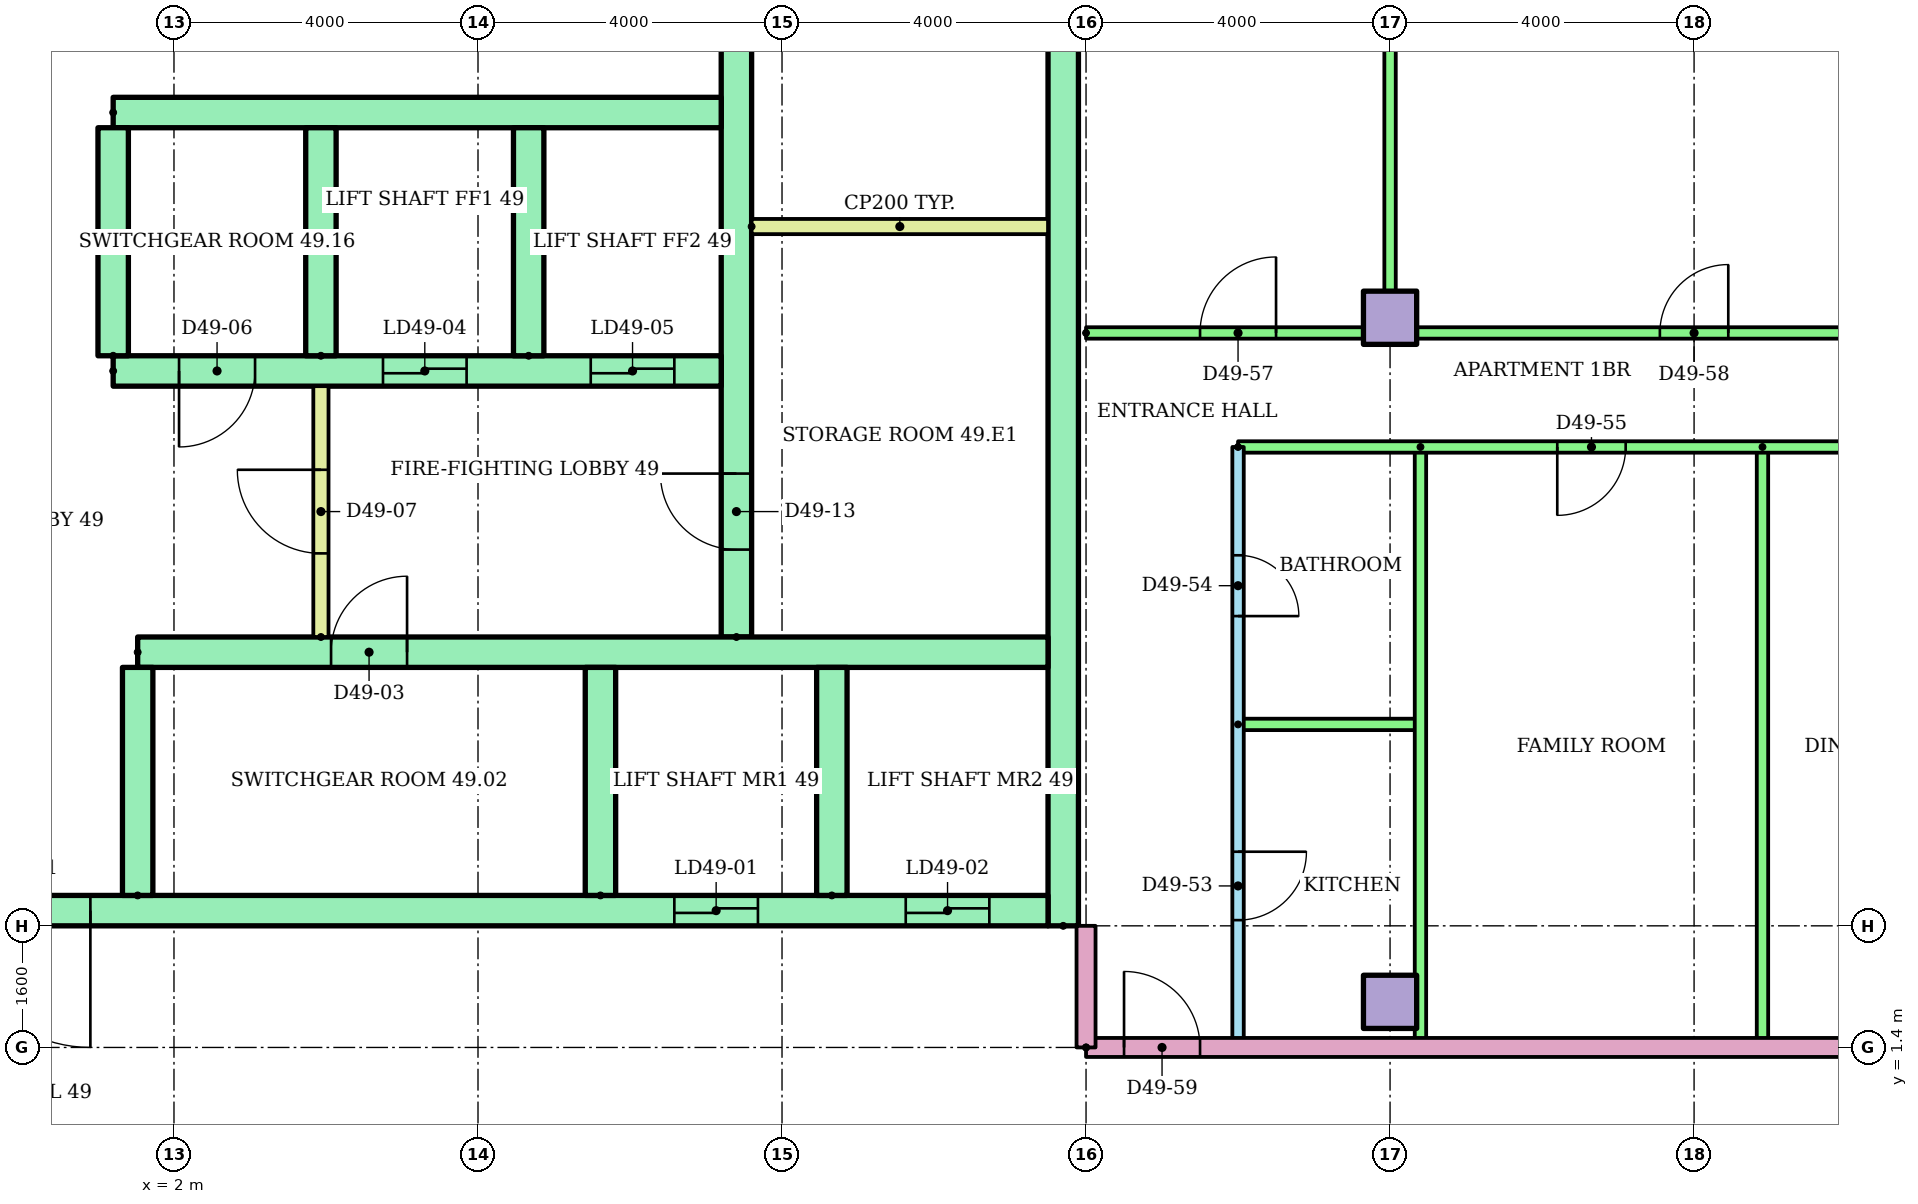
"""IFC4 building model, lengths in metres.
Left out: names, types, materials, properties, quantities, classifications, styles, units other than length and angle.
Written with IfcOpenShell. Run it as: python <this file> out.ifc"""

import sys

from ifc_helpers import new_model, si_unit, direction, frame, frame_2d, origin, origin_2d, place, context, subcontext, project, spatial, rectangle, extrude, element, fill, save


model = new_model("IFC4")
c1 = context("Model", 3, precision=1e-05, world=origin(), true_north=direction((0.0, 1.0)))
c2 = subcontext(c1, "Body", "Model", "MODEL_VIEW")
j1 = project(units=[si_unit("LENGTHUNIT", "METRE"), si_unit("PLANEANGLEUNIT", "RADIAN")], contexts=[c1])
p1 = place(None, origin())
s1 = spatial("IfcSite", under=j1, at=p1, CompositionType="ELEMENT")
p2 = place(p1, origin())
s2 = spatial("IfcBuilding", under=s1, at=p2, CompositionType="ELEMENT")
p3 = place(p2, frame((0.0, 0.0, 187.7)))
s3 = spatial("IfcBuildingStorey", under=s2, at=p3, CompositionType="ELEMENT", Elevation=187.7)
for number, where in (
    (1, (18.0, 2.0, 0.0)),
    (2, (18.0, 11.0, 0.0)),
):
    element("IfcColumn", number, at=place(p3, frame(where)), inside=s3, PredefinedType="COLUMN", context=c2, shape_type="SweptSolid", body=[
        extrude(rectangle(XDim=0.7, YDim=0.7, at=origin_2d()), origin(), (0.0, 0.0, 1.0), 3.2),
    ])
p4 = place(p3, frame((13.7, 3.0, 0.0), z_axis=(0.0, 0.0, 1.0), x_axis=(0.0, 1.0, 0.0)))
e3 = element("IfcWall", 3, at=p4, inside=s3, PredefinedType="SHEAR", context=c2, shape_type="SweptSolid", body=[
    extrude(rectangle(XDim=17.0, YDim=0.4, at=frame_2d((8.5, 0.0))), origin(), (0.0, 0.0, 1.0), 2.92),
])
p5 = place(p3, frame((9.4, 6.8, 0.0), z_axis=(0.0, 0.0, 1.0), x_axis=(0.0, 1.0, 0.0)))
e4 = element("IfcWall", 4, at=p5, inside=s3, PredefinedType="SHEAR", context=c2, shape_type="SweptSolid", body=[
    extrude(rectangle(XDim=12.7, YDim=0.4, at=frame_2d((6.35, 0.0))), origin(), (0.0, 0.0, 1.0), 2.92),
])
p6 = place(p5, frame((1.15, 0.0, 0.0)))
e5 = element("IfcOpeningElement", 5, at=p6, cuts=e4, PredefinedType="OPENING", context=c2, shape_type="SweptSolid", body=[
    extrude(rectangle(XDim=1.0, YDim=2.1, at=frame_2d((0.5, 1.05))), frame((0.0, 0.21, 0.0), z_axis=(0.0, -1.0, 0.0), x_axis=(1.0, 0.0, 0.0)), (0.0, 0.0, 1.0), 0.42),
])
p7 = place(p5, frame((7.925, 0.0, 0.0)))
e6 = element("IfcOpeningElement", 6, at=p7, cuts=e4, PredefinedType="OPENING", context=c2, shape_type="SweptSolid", body=[
    extrude(rectangle(XDim=1.0, YDim=2.1, at=frame_2d((0.5, 1.05))), frame((0.0, 0.21, 0.0), z_axis=(0.0, -1.0, 0.0), x_axis=(1.0, 0.0, 0.0)), (0.0, 0.0, 1.0), 0.42),
])
p8 = place(p3, frame((-13.5, 3.2, 0.0)))
e7 = element("IfcWall", 7, at=p8, inside=s3, PredefinedType="SHEAR", context=c2, shape_type="SweptSolid", body=[
    extrude(rectangle(XDim=27.0, YDim=0.4, at=frame_2d((13.5, 0.0))), origin(), (0.0, 0.0, 1.0), 2.92),
])
p9 = place(p8, frame((22.083, 0.0, 0.0)))
e8 = element("IfcOpeningElement", 8, at=p9, cuts=e7, PredefinedType="OPENING", context=c2, shape_type="SweptSolid", body=[
    extrude(rectangle(XDim=1.1, YDim=2.1, at=frame_2d((0.55, 1.05))), frame((0.0, 0.21, 0.0), z_axis=(0.0, -1.0, 0.0), x_axis=(1.0, 0.0, 0.0)), (0.0, 0.0, 1.0), 0.42),
])
p10 = place(p8, frame((25.128, 0.0, 0.0)))
e9 = element("IfcOpeningElement", 9, at=p10, cuts=e7, PredefinedType="OPENING", context=c2, shape_type="SweptSolid", body=[
    extrude(rectangle(XDim=1.1, YDim=2.1, at=frame_2d((0.55, 1.05))), frame((0.0, 0.21, 0.0), z_axis=(0.0, -1.0, 0.0), x_axis=(1.0, 0.0, 0.0)), (0.0, 0.0, 1.0), 0.42),
])
p11 = place(p8, frame((12.6, 0.0, 0.0)))
e10 = element("IfcOpeningElement", 10, at=p11, cuts=e7, PredefinedType="OPENING", context=c2, shape_type="SweptSolid", body=[
    extrude(rectangle(XDim=1.8, YDim=2.1, at=frame_2d((0.9, 1.05))), frame((0.0, 0.21, 0.0), z_axis=(0.0, -1.0, 0.0), x_axis=(1.0, 0.0, 0.0)), (0.0, 0.0, 1.0), 0.42),
])
p12 = place(p3, frame((1.522, 6.6, 0.0)))
e11 = element("IfcWall", 11, at=p12, inside=s3, PredefinedType="SHEAR", context=c2, shape_type="SweptSolid", body=[
    extrude(rectangle(XDim=11.978, YDim=0.4, at=frame_2d((5.989, 0.0))), origin(), (0.0, 0.0, 1.0), 2.92),
])
p13 = place(p12, frame((2.544, 0.0, 0.0)))
e12 = element("IfcOpeningElement", 12, at=p13, cuts=e11, PredefinedType="OPENING", context=c2, shape_type="SweptSolid", body=[
    extrude(rectangle(XDim=1.0, YDim=2.1, at=frame_2d((0.5, 1.05))), frame((0.0, 0.21, 0.0), z_axis=(0.0, -1.0, 0.0), x_axis=(1.0, 0.0, 0.0)), (0.0, 0.0, 1.0), 0.42),
])
for number, where, z_axis, x_axis in (
    (13, (1.522, 3.4, 0.0), (0.0, 0.0, 1.0), (0.0, 1.0, 0.0)),
    (14, (7.611, 3.4, 0.0), (0.0, 0.0, 1.0), (0.0, 1.0, 0.0)),
    (15, (10.656, 3.4, 0.0), (0.0, 0.0, 1.0), (0.0, 1.0, 0.0)),
):
    element("IfcWall", number, at=place(p3, frame(where, z_axis=z_axis, x_axis=x_axis)), inside=s3, PredefinedType="SHEAR", context=c2, shape_type="SweptSolid", body=[
        extrude(rectangle(XDim=3.0, YDim=0.4, at=frame_2d((1.5, 0.0))), origin(), (0.0, 0.0, 1.0), 2.92),
    ])
p14 = place(p3, frame((1.2, 10.3, 0.0)))
e16 = element("IfcWall", 16, at=p14, inside=s3, PredefinedType="SHEAR", context=c2, shape_type="SweptSolid", body=[
    extrude(rectangle(XDim=8.0, YDim=0.4, at=frame_2d((4.0, 0.0))), origin(), (0.0, 0.0, 1.0), 2.92),
])
p15 = place(p14, frame((3.55, 0.0, 0.0)))
e17 = element("IfcOpeningElement", 17, at=p15, cuts=e16, PredefinedType="OPENING", context=c2, shape_type="SweptSolid", body=[
    extrude(rectangle(XDim=1.1, YDim=2.1, at=frame_2d((0.55, 1.05))), frame((0.0, 0.21, 0.0), z_axis=(0.0, -1.0, 0.0), x_axis=(1.0, 0.0, 0.0)), (0.0, 0.0, 1.0), 0.42),
])
p16 = place(p14, frame((6.283, 0.0, 0.0)))
e18 = element("IfcOpeningElement", 18, at=p16, cuts=e16, PredefinedType="OPENING", context=c2, shape_type="SweptSolid", body=[
    extrude(rectangle(XDim=1.1, YDim=2.1, at=frame_2d((0.55, 1.05))), frame((0.0, 0.21, 0.0), z_axis=(0.0, -1.0, 0.0), x_axis=(1.0, 0.0, 0.0)), (0.0, 0.0, 1.0), 0.42),
])
p17 = place(p14, frame((0.867, 0.0, 0.0)))
e19 = element("IfcOpeningElement", 19, at=p17, cuts=e16, PredefinedType="OPENING", context=c2, shape_type="SweptSolid", body=[
    extrude(rectangle(XDim=1.0, YDim=2.1, at=frame_2d((0.5, 1.05))), frame((0.0, 0.21, 0.0), z_axis=(0.0, -1.0, 0.0), x_axis=(1.0, 0.0, 0.0)), (0.0, 0.0, 1.0), 0.42),
])
p18 = place(p3, frame((1.2, 13.7, 0.0)))
e20 = element("IfcWall", 20, at=p18, inside=s3, PredefinedType="SHEAR", context=c2, shape_type="SweptSolid", body=[
    extrude(rectangle(XDim=8.0, YDim=0.4, at=frame_2d((4.0, 0.0))), origin(), (0.0, 0.0, 1.0), 2.92),
])
for number, where, z_axis, x_axis in (
    (21, (1.2, 10.5, 0.0), (0.0, 0.0, 1.0), (0.0, 1.0, 0.0)),
    (22, (3.933, 10.5, 0.0), (0.0, 0.0, 1.0), (0.0, 1.0, 0.0)),
    (23, (6.667, 10.5, 0.0), (0.0, 0.0, 1.0), (0.0, 1.0, 0.0)),
):
    element("IfcWall", number, at=place(p3, frame(where, z_axis=z_axis, x_axis=x_axis)), inside=s3, PredefinedType="SHEAR", context=c2, shape_type="SweptSolid", body=[
        extrude(rectangle(XDim=3.0, YDim=0.4, at=frame_2d((1.5, 0.0))), origin(), (0.0, 0.0, 1.0), 2.92),
    ])
p19 = place(p3, frame((3.933, 6.8, 0.0), z_axis=(0.0, 0.0, 1.0), x_axis=(0.0, 1.0, 0.0)))
e24 = element("IfcWall", 24, at=p19, inside=s3, PredefinedType="PARTITIONING", context=c2, shape_type="SweptSolid", body=[
    extrude(rectangle(XDim=3.3, YDim=0.2, at=frame_2d((1.65, 0.0))), origin(), (0.0, 0.0, 1.0), 2.92),
])
p20 = place(p19, frame((1.1, 0.0, 0.0)))
e25 = element("IfcOpeningElement", 25, at=p20, cuts=e24, PredefinedType="OPENING", context=c2, shape_type="SweptSolid", body=[
    extrude(rectangle(XDim=1.1, YDim=2.1, at=frame_2d((0.55, 1.05))), frame((0.0, 0.11, 0.0), z_axis=(0.0, -1.0, 0.0), x_axis=(1.0, 0.0, 0.0)), (0.0, 0.0, 1.0), 0.22),
])
p21 = place(p3, frame((9.6, 12.2, 0.0)))
e26 = element("IfcWall", 26, at=p21, inside=s3, PredefinedType="PARTITIONING", context=c2, shape_type="SweptSolid", body=[
    extrude(rectangle(XDim=3.9, YDim=0.2, at=frame_2d((1.95, 0.0))), origin(), (0.0, 0.0, 1.0), 2.92),
])
p22 = place(p3, frame((16.0, 9.3, 0.0), z_axis=(0.0, 0.0, 1.0), x_axis=(0.0, -1.0, 0.0)))
e27 = element("IfcWall", 27, at=p22, inside=s3, PredefinedType="PARTITIONING", context=c2, shape_type="SweptSolid", body=[
    extrude(rectangle(XDim=7.9, YDim=0.15, at=frame_2d((3.95, 0.0))), origin(), (0.0, 0.0, 1.0), 2.4),
])
p23 = place(p22, frame((5.325, 0.0, 0.0)))
e28 = element("IfcOpeningElement", 28, at=p23, cuts=e27, PredefinedType="OPENING", context=c2, shape_type="SweptSolid", body=[
    extrude(rectangle(XDim=0.9, YDim=2.1, at=frame_2d((0.45, 1.05))), frame((0.0, 0.085, 0.0), z_axis=(0.0, -1.0, 0.0), x_axis=(1.0, 0.0, 0.0)), (0.0, 0.0, 1.0), 0.17),
])
p24 = place(p22, frame((1.425, 0.0, 0.0)))
e29 = element("IfcOpeningElement", 29, at=p24, cuts=e27, PredefinedType="OPENING", context=c2, shape_type="SweptSolid", body=[
    extrude(rectangle(XDim=0.8, YDim=2.1, at=frame_2d((0.4, 1.05))), frame((0.0, 0.085, 0.0), z_axis=(0.0, -1.0, 0.0), x_axis=(1.0, 0.0, 0.0)), (0.0, 0.0, 1.0), 0.17),
])
p25 = place(p3, frame((16.0, 5.65, 0.0)))
e30 = element("IfcWall", 30, at=p25, inside=s3, PredefinedType="PARTITIONING", context=c2, shape_type="SweptSolid", body=[
    extrude(rectangle(XDim=2.4, YDim=0.15, at=frame_2d((1.2, 0.0))), origin(), (0.0, 0.0, 1.0), 2.4),
])
for number, where, z_axis, x_axis in (
    (31, (18.4, 9.3, 0.0), (0.0, 0.0, 1.0), (0.0, -1.0, 0.0)),
    (32, (22.9, 9.3, 0.0), (0.0, 0.0, 1.0), (0.0, -1.0, 0.0)),
):
    element("IfcWall", number, at=place(p3, frame(where, z_axis=z_axis, x_axis=x_axis)), inside=s3, PredefinedType="PARTITIONING", context=c2, shape_type="SweptSolid", body=[
        extrude(rectangle(XDim=7.9, YDim=0.15, at=frame_2d((3.95, 0.0))), origin(), (0.0, 0.0, 1.0), 2.4),
    ])
p26 = place(p3, frame((26.0, 9.3, 0.0), z_axis=(0.0, 0.0, 1.0), x_axis=(-1.0, 0.0, 0.0)))
e33 = element("IfcWall", 33, at=p26, inside=s3, PredefinedType="PARTITIONING", context=c2, shape_type="SweptSolid", body=[
    extrude(rectangle(XDim=10.0, YDim=0.15, at=frame_2d((5.0, 0.0))), origin(), (0.0, 0.0, 1.0), 2.4),
])
p27 = place(p26, frame((4.9, 0.0, 0.0)))
e34 = element("IfcOpeningElement", 34, at=p27, cuts=e33, PredefinedType="OPENING", context=c2, shape_type="SweptSolid", body=[
    extrude(rectangle(XDim=0.9, YDim=2.1, at=frame_2d((0.45, 1.05))), frame((0.0, 0.085, 0.0), z_axis=(0.0, -1.0, 0.0), x_axis=(1.0, 0.0, 0.0)), (0.0, 0.0, 1.0), 0.17),
])
p28 = place(p26, frame((1.1, 0.0, 0.0)))
e35 = element("IfcOpeningElement", 35, at=p28, cuts=e33, PredefinedType="OPENING", context=c2, shape_type="SweptSolid", body=[
    extrude(rectangle(XDim=0.9, YDim=2.1, at=frame_2d((0.45, 1.05))), frame((0.0, 0.085, 0.0), z_axis=(0.0, -1.0, 0.0), x_axis=(1.0, 0.0, 0.0)), (0.0, 0.0, 1.0), 0.17),
])
p29 = place(p3, frame((14.0, 10.8, 0.0)))
e36 = element("IfcWall", 36, at=p29, inside=s3, PredefinedType="PARTITIONING", context=c2, shape_type="SweptSolid", body=[
    extrude(rectangle(XDim=12.0, YDim=0.15, at=frame_2d((6.0, 0.0))), origin(), (0.0, 0.0, 1.0), 2.4),
])
p30 = place(p29, frame((1.5, 0.0, 0.0)))
e37 = element("IfcOpeningElement", 37, at=p30, cuts=e36, PredefinedType="OPENING", context=c2, shape_type="SweptSolid", body=[
    extrude(rectangle(XDim=1.0, YDim=2.1, at=frame_2d((0.5, 1.05))), frame((0.0, 0.085, 0.0), z_axis=(0.0, -1.0, 0.0), x_axis=(1.0, 0.0, 0.0)), (0.0, 0.0, 1.0), 0.17),
])
p31 = place(p29, frame((7.55, 0.0, 0.0)))
e38 = element("IfcOpeningElement", 38, at=p31, cuts=e36, PredefinedType="OPENING", context=c2, shape_type="SweptSolid", body=[
    extrude(rectangle(XDim=0.9, YDim=2.1, at=frame_2d((0.45, 1.05))), frame((0.0, 0.085, 0.0), z_axis=(0.0, -1.0, 0.0), x_axis=(1.0, 0.0, 0.0)), (0.0, 0.0, 1.0), 0.17),
])
p32 = place(p3, frame((18.0, 18.821, 0.0), z_axis=(0.0, 0.0, 1.0), x_axis=(0.0, -1.0, 0.0)))
e39 = element("IfcWall", 39, at=p32, inside=s3, PredefinedType="PARTITIONING", context=c2, shape_type="SweptSolid", body=[
    extrude(rectangle(XDim=8.021, YDim=0.15, at=frame_2d((4.01, 0.0))), origin(), (0.0, 0.0, 1.0), 2.4),
])
p33 = place(p3, frame((14.0, 1.4, 0.0)))
e40 = element("IfcWall", 40, at=p33, inside=s3, PredefinedType="PARTITIONING", context=c2, shape_type="SweptSolid", body=[
    extrude(rectangle(XDim=15.0, YDim=0.25, at=frame_2d((7.5, 0.0))), origin(), (0.0, 0.0, 1.0), 2.4),
])
p34 = place(p33, frame((0.5, 0.0, 0.0)))
e41 = element("IfcOpeningElement", 41, at=p34, cuts=e40, PredefinedType="OPENING", context=c2, shape_type="SweptSolid", body=[
    extrude(rectangle(XDim=1.0, YDim=2.1, at=frame_2d((0.5, 1.05))), frame((0.0, 0.135, 0.0), z_axis=(0.0, -1.0, 0.0), x_axis=(1.0, 0.0, 0.0)), (0.0, 0.0, 1.0), 0.27),
])
p35 = place(p33, frame((12.547, 0.0, 0.0)))
e42 = element("IfcOpeningElement", 42, at=p35, cuts=e40, PredefinedType="OPENING", context=c2, shape_type="SweptSolid", body=[
    extrude(rectangle(XDim=1.0, YDim=2.1, at=frame_2d((0.5, 1.05))), frame((0.0, 0.135, 0.0), z_axis=(0.0, -1.0, 0.0), x_axis=(1.0, 0.0, 0.0)), (0.0, 0.0, 1.0), 0.27),
])
p36 = place(p3, frame((14.0, 1.4, 0.0), z_axis=(0.0, 0.0, 1.0), x_axis=(0.0, 1.0, 0.0)))
e43 = element("IfcWall", 43, at=p36, inside=s3, PredefinedType="PARTITIONING", context=c2, shape_type="SweptSolid", body=[
    extrude(rectangle(XDim=1.6, YDim=0.25, at=frame_2d((0.8, 0.0))), origin(), (0.0, 0.0, 1.0), 2.4),
])
p37 = place(p9, origin())
e44 = element("IfcDoor", 44, at=p37, inside=s3, OperationType="SLIDING_TO_LEFT", PredefinedType="DOOR", context=c2, shape_type="SweptSolid", body=[
    extrude(rectangle(XDim=1.1, YDim=2.1, at=frame_2d((0.55, 1.05))), frame((0.0, 0.025, 0.0), z_axis=(0.0, -1.0, 0.0), x_axis=(1.0, 0.0, 0.0)), (0.0, 0.0, 1.0), 0.05),
])
fill(e8, e44)
p38 = place(p10, origin())
e45 = element("IfcDoor", 45, at=p38, inside=s3, OperationType="SLIDING_TO_LEFT", PredefinedType="DOOR", context=c2, shape_type="SweptSolid", body=[
    extrude(rectangle(XDim=1.1, YDim=2.1, at=frame_2d((0.55, 1.05))), frame((0.0, 0.025, 0.0), z_axis=(0.0, -1.0, 0.0), x_axis=(1.0, 0.0, 0.0)), (0.0, 0.0, 1.0), 0.05),
])
fill(e9, e45)
p39 = place(p11, frame((1.8, 0.0, 0.0), z_axis=(0.0, 0.0, 1.0), x_axis=(-1.0, 0.0, 0.0)))
e46 = element("IfcDoor", 46, at=p39, inside=s3, OperationType="DOUBLE_DOOR_SINGLE_SWING", PredefinedType="DOOR", context=c2, shape_type="SweptSolid", body=[
    extrude(rectangle(XDim=1.8, YDim=2.1, at=frame_2d((0.9, 1.05))), frame((0.0, 0.025, 0.0), z_axis=(0.0, -1.0, 0.0), x_axis=(1.0, 0.0, 0.0)), (0.0, 0.0, 1.0), 0.05),
])
fill(e10, e46)
p40 = place(p13, origin())
e47 = element("IfcDoor", 47, at=p40, inside=s3, OperationType="SINGLE_SWING_RIGHT", PredefinedType="DOOR", context=c2, shape_type="SweptSolid", body=[
    extrude(rectangle(XDim=1.0, YDim=2.1, at=frame_2d((0.5, 1.05))), frame((0.0, 0.025, 0.0), z_axis=(0.0, -1.0, 0.0), x_axis=(1.0, 0.0, 0.0)), (0.0, 0.0, 1.0), 0.05),
])
fill(e12, e47)
p41 = place(p15, origin())
e48 = element("IfcDoor", 48, at=p41, inside=s3, OperationType="SLIDING_TO_LEFT", PredefinedType="DOOR", context=c2, shape_type="SweptSolid", body=[
    extrude(rectangle(XDim=1.1, YDim=2.1, at=frame_2d((0.55, 1.05))), frame((0.0, 0.025, 0.0), z_axis=(0.0, -1.0, 0.0), x_axis=(1.0, 0.0, 0.0)), (0.0, 0.0, 1.0), 0.05),
])
fill(e17, e48)
p42 = place(p16, origin())
e49 = element("IfcDoor", 49, at=p42, inside=s3, OperationType="SLIDING_TO_LEFT", PredefinedType="DOOR", context=c2, shape_type="SweptSolid", body=[
    extrude(rectangle(XDim=1.1, YDim=2.1, at=frame_2d((0.55, 1.05))), frame((0.0, 0.025, 0.0), z_axis=(0.0, -1.0, 0.0), x_axis=(1.0, 0.0, 0.0)), (0.0, 0.0, 1.0), 0.05),
])
fill(e18, e49)
p43 = place(p17, frame((1.0, 0.0, 0.0), z_axis=(0.0, 0.0, 1.0), x_axis=(-1.0, 0.0, 0.0)))
e50 = element("IfcDoor", 50, at=p43, inside=s3, OperationType="SINGLE_SWING_LEFT", PredefinedType="DOOR", context=c2, shape_type="SweptSolid", body=[
    extrude(rectangle(XDim=1.0, YDim=2.1, at=frame_2d((0.5, 1.05))), frame((0.0, 0.025, 0.0), z_axis=(0.0, -1.0, 0.0), x_axis=(1.0, 0.0, 0.0)), (0.0, 0.0, 1.0), 0.05),
])
fill(e19, e50)
p44 = place(p20, origin())
e51 = element("IfcDoor", 51, at=p44, inside=s3, OperationType="SINGLE_SWING_RIGHT", PredefinedType="DOOR", context=c2, shape_type="SweptSolid", body=[
    extrude(rectangle(XDim=1.1, YDim=2.1, at=frame_2d((0.55, 1.05))), frame((0.0, 0.025, 0.0), z_axis=(0.0, -1.0, 0.0), x_axis=(1.0, 0.0, 0.0)), (0.0, 0.0, 1.0), 0.05),
])
fill(e25, e51)
p45 = place(p6, origin())
e52 = element("IfcDoor", 52, at=p45, inside=s3, OperationType="SINGLE_SWING_RIGHT", PredefinedType="DOOR", context=c2, shape_type="SweptSolid", body=[
    extrude(rectangle(XDim=1.0, YDim=2.1, at=frame_2d((0.5, 1.05))), frame((0.0, 0.025, 0.0), z_axis=(0.0, -1.0, 0.0), x_axis=(1.0, 0.0, 0.0)), (0.0, 0.0, 1.0), 0.05),
])
fill(e5, e52)
p46 = place(p23, origin())
e53 = element("IfcDoor", 53, at=p46, inside=s3, OperationType="SINGLE_SWING_LEFT", PredefinedType="DOOR", context=c2, shape_type="SweptSolid", body=[
    extrude(rectangle(XDim=0.9, YDim=2.1, at=frame_2d((0.45, 1.05))), frame((0.0, 0.025, 0.0), z_axis=(0.0, -1.0, 0.0), x_axis=(1.0, 0.0, 0.0)), (0.0, 0.0, 1.0), 0.05),
])
fill(e28, e53)
p47 = place(p24, origin())
e54 = element("IfcDoor", 54, at=p47, inside=s3, OperationType="SINGLE_SWING_RIGHT", PredefinedType="DOOR", context=c2, shape_type="SweptSolid", body=[
    extrude(rectangle(XDim=0.8, YDim=2.1, at=frame_2d((0.4, 1.05))), frame((0.0, 0.025, 0.0), z_axis=(0.0, -1.0, 0.0), x_axis=(1.0, 0.0, 0.0)), (0.0, 0.0, 1.0), 0.05),
])
fill(e29, e54)
p48 = place(p27, origin())
e55 = element("IfcDoor", 55, at=p48, inside=s3, OperationType="SINGLE_SWING_RIGHT", PredefinedType="DOOR", context=c2, shape_type="SweptSolid", body=[
    extrude(rectangle(XDim=0.9, YDim=2.1, at=frame_2d((0.45, 1.05))), frame((0.0, 0.025, 0.0), z_axis=(0.0, -1.0, 0.0), x_axis=(1.0, 0.0, 0.0)), (0.0, 0.0, 1.0), 0.05),
])
fill(e34, e55)
p49 = place(p30, origin())
e56 = element("IfcDoor", 56, at=p49, inside=s3, OperationType="SINGLE_SWING_RIGHT", PredefinedType="DOOR", context=c2, shape_type="SweptSolid", body=[
    extrude(rectangle(XDim=1.0, YDim=2.1, at=frame_2d((0.5, 1.05))), frame((0.0, 0.025, 0.0), z_axis=(0.0, -1.0, 0.0), x_axis=(1.0, 0.0, 0.0)), (0.0, 0.0, 1.0), 0.05),
])
fill(e37, e56)
p50 = place(p31, origin())
e57 = element("IfcDoor", 57, at=p50, inside=s3, OperationType="SINGLE_SWING_RIGHT", PredefinedType="DOOR", context=c2, shape_type="SweptSolid", body=[
    extrude(rectangle(XDim=0.9, YDim=2.1, at=frame_2d((0.45, 1.05))), frame((0.0, 0.025, 0.0), z_axis=(0.0, -1.0, 0.0), x_axis=(1.0, 0.0, 0.0)), (0.0, 0.0, 1.0), 0.05),
])
fill(e38, e57)
p51 = place(p34, origin())
e58 = element("IfcDoor", 58, at=p51, inside=s3, OperationType="SINGLE_SWING_LEFT", PredefinedType="DOOR", context=c2, shape_type="SweptSolid", body=[
    extrude(rectangle(XDim=1.0, YDim=2.1, at=frame_2d((0.5, 1.05))), frame((0.0, 0.025, 0.0), z_axis=(0.0, -1.0, 0.0), x_axis=(1.0, 0.0, 0.0)), (0.0, 0.0, 1.0), 0.05),
])
fill(e41, e58)
save(model, sys.argv[1])
